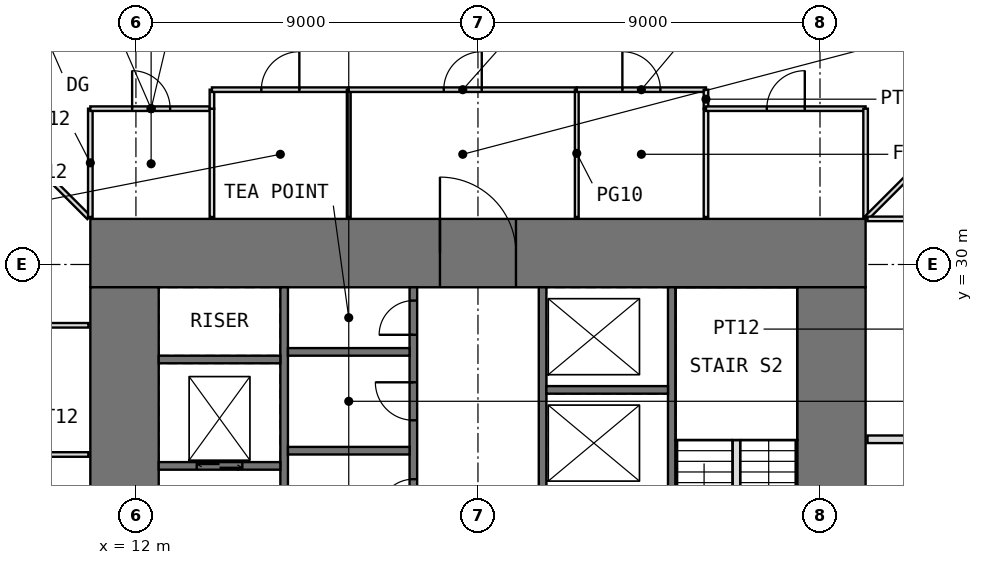
"""IFC4 building model, lengths in metres.
Left out: names, types, materials, properties, quantities, classifications, styles, units other than length and angle.
Written with IfcOpenShell. Run it as: python <this file> out.ifc"""

import sys

from ifc_helpers import new_model, si_unit, direction, frame, frame_2d, origin, place, context, subcontext, project, spatial, rectangle, extrude, element, fill, save


model = new_model("IFC4")
c1 = context("Model", 3, precision=1e-05, world=origin(), true_north=direction((0.0, 1.0)))
c2 = subcontext(c1, "Body", "Model", "MODEL_VIEW")
j1 = project(units=[si_unit("LENGTHUNIT", "METRE"), si_unit("PLANEANGLEUNIT", "RADIAN")], contexts=[c1])
p1 = place(None, origin())
s1 = spatial("IfcSite", under=j1, at=p1, CompositionType="ELEMENT")
p2 = place(p1, origin())
s2 = spatial("IfcBuilding", under=s1, at=p2, CompositionType="ELEMENT")
p3 = place(p2, frame((0.0, 0.0, 42.5)))
s3 = spatial("IfcBuildingStorey", under=s2, at=p3, CompositionType="ELEMENT", Elevation=42.5)
p4 = place(p3, frame((10.8, 30.3, -0.05), z_axis=(0.0, 0.0, 1.0), x_axis=(1.0, 0.0, 0.0)))
e1 = element("IfcWall", 1, at=p4, inside=s3, PredefinedType="SHEAR", context=c2, shape_type="SweptSolid", body=[
    extrude(rectangle(XDim=20.4, YDim=1.8, at=frame_2d((10.2, 0.0))), origin(), (0.0, 0.0, 1.0), 4.0),
])
p5 = place(p4, frame((9.2, 0.0, 0.05)))
e2 = element("IfcOpeningElement", 2, at=p5, cuts=e1, PredefinedType="OPENING", context=c2, shape_type="SweptSolid", body=[
    extrude(rectangle(XDim=2.0, YDim=2.2, at=frame_2d((1.0, 1.1))), frame((0.0, 0.91, 0.0), z_axis=(0.0, -1.0, 0.0), x_axis=(1.0, 0.0, 0.0)), (0.0, 0.0, 1.0), 1.82),
])
p6 = place(p3, frame((11.7, 12.6, -0.05), z_axis=(0.0, 0.0, 1.0), x_axis=(0.0, 1.0, 0.0)))
e3 = element("IfcWall", 3, at=p6, inside=s3, PredefinedType="SHEAR", context=c2, shape_type="SweptSolid", body=[
    extrude(rectangle(XDim=16.8, YDim=1.8, at=frame_2d((8.4, 0.0))), origin(), (0.0, 0.0, 1.0), 4.0),
])
p7 = place(p6, frame((9.9, 0.0, 0.05)))
e4 = element("IfcOpeningElement", 4, at=p7, cuts=e3, PredefinedType="OPENING", context=c2, shape_type="SweptSolid", body=[
    extrude(rectangle(XDim=1.0, YDim=2.2, at=frame_2d((0.5, 1.1))), frame((0.0, 0.91, 0.0), z_axis=(0.0, -1.0, 0.0), x_axis=(1.0, 0.0, 0.0)), (0.0, 0.0, 1.0), 1.82),
])
p8 = place(p3, frame((30.3, 12.6, -0.05), z_axis=(0.0, 0.0, 1.0), x_axis=(0.0, 1.0, 0.0)))
e5 = element("IfcWall", 5, at=p8, inside=s3, PredefinedType="SHEAR", context=c2, shape_type="SweptSolid", body=[
    extrude(rectangle(XDim=16.8, YDim=1.8, at=frame_2d((8.4, 0.0))), origin(), (0.0, 0.0, 1.0), 4.0),
])
p9 = place(p8, frame((5.9, 0.0, 0.05)))
e6 = element("IfcOpeningElement", 6, at=p9, cuts=e5, PredefinedType="OPENING", context=c2, shape_type="SweptSolid", body=[
    extrude(rectangle(XDim=1.0, YDim=2.2, at=frame_2d((0.5, 1.1))), frame((0.0, 0.91, 0.0), z_axis=(0.0, -1.0, 0.0), x_axis=(1.0, 0.0, 0.0)), (0.0, 0.0, 1.0), 1.82),
])
p10 = place(p3, frame((15.9, 12.6, -0.05), z_axis=(0.0, 0.0, 1.0), x_axis=(0.0, 1.0, 0.0)))
e7 = element("IfcWall", 7, at=p10, inside=s3, PredefinedType="SHEAR", context=c2, shape_type="SweptSolid", body=[
    extrude(rectangle(XDim=16.8, YDim=0.2, at=frame_2d((8.4, 0.0))), origin(), (0.0, 0.0, 1.0), 4.0),
])
p11 = place(p10, frame((8.9, 0.0, 0.05)))
e8 = element("IfcOpeningElement", 8, at=p11, cuts=e7, PredefinedType="OPENING", context=c2, shape_type="SweptSolid", body=[
    extrude(rectangle(XDim=1.0, YDim=2.2, at=frame_2d((0.5, 1.1))), frame((0.0, 0.11, 0.0), z_axis=(0.0, -1.0, 0.0), x_axis=(1.0, 0.0, 0.0)), (0.0, 0.0, 1.0), 0.22),
])
p12 = place(p3, frame((19.3, 12.6, -0.05), z_axis=(0.0, 0.0, 1.0), x_axis=(0.0, 1.0, 0.0)))
e9 = element("IfcWall", 9, at=p12, inside=s3, PredefinedType="SHEAR", context=c2, shape_type="SweptSolid", body=[
    extrude(rectangle(XDim=16.8, YDim=0.2, at=frame_2d((8.4, 0.0))), origin(), (0.0, 0.0, 1.0), 4.0),
])
p13 = place(p12, frame((8.7, 0.0, 0.05)))
e10 = element("IfcOpeningElement", 10, at=p13, cuts=e9, PredefinedType="OPENING", context=c2, shape_type="SweptSolid", body=[
    extrude(rectangle(XDim=1.0, YDim=2.2, at=frame_2d((0.5, 1.1))), frame((0.0, 0.11, 0.0), z_axis=(0.0, -1.0, 0.0), x_axis=(1.0, 0.0, 0.0)), (0.0, 0.0, 1.0), 0.22),
])
p14 = place(p12, frame((10.85, 0.0, 0.05)))
e11 = element("IfcOpeningElement", 11, at=p14, cuts=e9, PredefinedType="OPENING", context=c2, shape_type="SweptSolid", body=[
    extrude(rectangle(XDim=0.9, YDim=2.2, at=frame_2d((0.45, 1.1))), frame((0.0, 0.11, 0.0), z_axis=(0.0, -1.0, 0.0), x_axis=(1.0, 0.0, 0.0)), (0.0, 0.0, 1.0), 0.22),
])
p15 = place(p12, frame((13.3, 0.0, 0.05)))
e12 = element("IfcOpeningElement", 12, at=p15, cuts=e9, PredefinedType="OPENING", context=c2, shape_type="SweptSolid", body=[
    extrude(rectangle(XDim=1.0, YDim=2.2, at=frame_2d((0.5, 1.1))), frame((0.0, 0.11, 0.0), z_axis=(0.0, -1.0, 0.0), x_axis=(1.0, 0.0, 0.0)), (0.0, 0.0, 1.0), 0.22),
])
p16 = place(p12, frame((15.55, 0.0, 0.05)))
e13 = element("IfcOpeningElement", 13, at=p16, cuts=e9, PredefinedType="OPENING", context=c2, shape_type="SweptSolid", body=[
    extrude(rectangle(XDim=0.9, YDim=2.2, at=frame_2d((0.45, 1.1))), frame((0.0, 0.11, 0.0), z_axis=(0.0, -1.0, 0.0), x_axis=(1.0, 0.0, 0.0)), (0.0, 0.0, 1.0), 0.22),
])
p17 = place(p12, frame((0.75, 0.0, 0.05)))
e14 = element("IfcOpeningElement", 14, at=p17, cuts=e9, PredefinedType="OPENING", context=c2, shape_type="SweptSolid", body=[
    extrude(rectangle(XDim=1.1, YDim=2.2, at=frame_2d((0.55, 1.1))), frame((0.0, 0.11, 0.0), z_axis=(0.0, -1.0, 0.0), x_axis=(1.0, 0.0, 0.0)), (0.0, 0.0, 1.0), 0.22),
])
p18 = place(p12, frame((3.55, 0.0, 0.05)))
e15 = element("IfcOpeningElement", 15, at=p18, cuts=e9, PredefinedType="OPENING", context=c2, shape_type="SweptSolid", body=[
    extrude(rectangle(XDim=1.1, YDim=2.2, at=frame_2d((0.55, 1.1))), frame((0.0, 0.11, 0.0), z_axis=(0.0, -1.0, 0.0), x_axis=(1.0, 0.0, 0.0)), (0.0, 0.0, 1.0), 0.22),
])
p19 = place(p12, frame((6.35, 0.0, 0.05)))
e16 = element("IfcOpeningElement", 16, at=p19, cuts=e9, PredefinedType="OPENING", context=c2, shape_type="SweptSolid", body=[
    extrude(rectangle(XDim=1.1, YDim=2.2, at=frame_2d((0.55, 1.1))), frame((0.0, 0.11, 0.0), z_axis=(0.0, -1.0, 0.0), x_axis=(1.0, 0.0, 0.0)), (0.0, 0.0, 1.0), 0.22),
])
p20 = place(p3, frame((22.7, 12.6, -0.05), z_axis=(0.0, 0.0, 1.0), x_axis=(0.0, 1.0, 0.0)))
e17 = element("IfcWall", 17, at=p20, inside=s3, PredefinedType="SHEAR", context=c2, shape_type="SweptSolid", body=[
    extrude(rectangle(XDim=16.8, YDim=0.2, at=frame_2d((8.4, 0.0))), origin(), (0.0, 0.0, 1.0), 4.0),
])
p21 = place(p20, frame((7.1, 0.0, 0.05)))
e18 = element("IfcOpeningElement", 18, at=p21, cuts=e17, PredefinedType="OPENING", context=c2, shape_type="SweptSolid", body=[
    extrude(rectangle(XDim=1.0, YDim=2.2, at=frame_2d((0.5, 1.1))), frame((0.0, 0.11, 0.0), z_axis=(0.0, -1.0, 0.0), x_axis=(1.0, 0.0, 0.0)), (0.0, 0.0, 1.0), 0.22),
])
p22 = place(p20, frame((1.55, 0.0, 0.05)))
e19 = element("IfcOpeningElement", 19, at=p22, cuts=e17, PredefinedType="OPENING", context=c2, shape_type="SweptSolid", body=[
    extrude(rectangle(XDim=0.9, YDim=2.2, at=frame_2d((0.45, 1.1))), frame((0.0, 0.11, 0.0), z_axis=(0.0, -1.0, 0.0), x_axis=(1.0, 0.0, 0.0)), (0.0, 0.0, 1.0), 0.22),
])
p23 = place(p20, frame((4.95, 0.0, 0.05)))
e20 = element("IfcOpeningElement", 20, at=p23, cuts=e17, PredefinedType="OPENING", context=c2, shape_type="SweptSolid", body=[
    extrude(rectangle(XDim=0.9, YDim=2.2, at=frame_2d((0.45, 1.1))), frame((0.0, 0.11, 0.0), z_axis=(0.0, -1.0, 0.0), x_axis=(1.0, 0.0, 0.0)), (0.0, 0.0, 1.0), 0.22),
])
p24 = place(p3, frame((26.1, 12.6, -0.05), z_axis=(0.0, 0.0, 1.0), x_axis=(0.0, 1.0, 0.0)))
e21 = element("IfcWall", 21, at=p24, inside=s3, PredefinedType="SHEAR", context=c2, shape_type="SweptSolid", body=[
    extrude(rectangle(XDim=16.8, YDim=0.2, at=frame_2d((8.4, 0.0))), origin(), (0.0, 0.0, 1.0), 4.0),
])
p25 = place(p24, frame((6.9, 0.0, 0.05)))
e22 = element("IfcOpeningElement", 22, at=p25, cuts=e21, PredefinedType="OPENING", context=c2, shape_type="SweptSolid", body=[
    extrude(rectangle(XDim=1.0, YDim=2.2, at=frame_2d((0.5, 1.1))), frame((0.0, 0.11, 0.0), z_axis=(0.0, -1.0, 0.0), x_axis=(1.0, 0.0, 0.0)), (0.0, 0.0, 1.0), 0.22),
])
p26 = place(p3, frame((12.6, 24.7, -0.05), z_axis=(0.0, 0.0, 1.0), x_axis=(1.0, 0.0, 0.0)))
e23 = element("IfcWall", 23, at=p26, inside=s3, PredefinedType="SHEAR", context=c2, shape_type="SweptSolid", body=[
    extrude(rectangle(XDim=3.2, YDim=0.2, at=frame_2d((1.6, 0.0))), origin(), (0.0, 0.0, 1.0), 4.0),
])
p27 = place(p26, frame((1.0, 0.0, 0.05)))
e24 = element("IfcOpeningElement", 24, at=p27, cuts=e23, PredefinedType="OPENING", context=c2, shape_type="SweptSolid", body=[
    extrude(rectangle(XDim=1.2, YDim=2.2, at=frame_2d((0.6, 1.1))), frame((0.0, 0.11, 0.0), z_axis=(0.0, -1.0, 0.0), x_axis=(1.0, 0.0, 0.0)), (0.0, 0.0, 1.0), 0.22),
])
for number, where, z_axis, x_axis in (
    (25, (12.6, 27.5, -0.05), (0.0, 0.0, 1.0), (1.0, 0.0, 0.0)),
    (26, (16.0, 25.1, -0.05), (0.0, 0.0, 1.0), (1.0, 0.0, 0.0)),
    (27, (16.0, 27.7, -0.05), (0.0, 0.0, 1.0), (1.0, 0.0, 0.0)),
    (28, (22.8, 26.7, -0.05), (0.0, 0.0, 1.0), (1.0, 0.0, 0.0)),
):
    element("IfcWall", number, at=place(p3, frame(where, z_axis=z_axis, x_axis=x_axis)), inside=s3, PredefinedType="SHEAR", context=c2, shape_type="SweptSolid", body=[
        extrude(rectangle(XDim=3.2, YDim=0.2, at=frame_2d((1.6, 0.0))), origin(), (0.0, 0.0, 1.0), 4.0),
    ])
for number, where, z_axis, x_axis in (
    (29, (7.9, 25.0, 0.0), (0.0, 0.0, 1.0), (1.0, 0.0, 0.0)),
    (30, (7.9, 28.4, 0.0), (0.0, 0.0, 1.0), (1.0, 0.0, 0.0)),
):
    element("IfcWall", number, at=place(p3, frame(where, z_axis=z_axis, x_axis=x_axis)), inside=s3, PredefinedType="PARTITIONING", context=c2, shape_type="SweptSolid", body=[
        extrude(rectangle(XDim=2.85, YDim=0.12, at=frame_2d((1.425, 0.0))), origin(), (0.0, 0.0, 1.0), 3.75),
    ])
p28 = place(p3, frame((8.398, 33.602, 0.0), z_axis=(0.0, 0.0, 1.0), x_axis=(0.707106781187, -0.707106781187, 0.0)))
e31 = element("IfcWall", 31, at=p28, inside=s3, PredefinedType="PARTITIONING", context=c2, shape_type="SweptSolid", body=[
    extrude(rectangle(XDim=3.346, YDim=0.12, at=frame_2d((1.673, 0.0))), origin(), (0.0, 0.0, 1.0), 3.75),
])
p29 = place(p3, frame((10.8, 31.25, 0.0), z_axis=(0.0, 0.0, 1.0), x_axis=(0.0, 1.0, 0.0)))
e32 = element("IfcWall", 32, at=p29, inside=s3, PredefinedType="PARTITIONING", context=c2, shape_type="SweptSolid", body=[
    extrude(rectangle(XDim=2.85, YDim=0.12, at=frame_2d((1.425, 0.0))), origin(), (0.0, 0.0, 1.0), 3.75),
])
p30 = place(p3, frame((10.8, 34.1, 0.0), z_axis=(0.0, 0.0, 1.0), x_axis=(1.0, 0.0, 0.0)))
e33 = element("IfcWall", 33, at=p30, inside=s3, PredefinedType="PARTITIONING", context=c2, shape_type="SweptSolid", body=[
    extrude(rectangle(XDim=3.2, YDim=0.12, at=frame_2d((1.6, 0.0))), origin(), (0.0, 0.0, 1.0), 3.75),
])
p31 = place(p30, frame((1.1, 0.0, 0.0)))
e34 = element("IfcOpeningElement", 34, at=p31, cuts=e33, PredefinedType="OPENING", context=c2, shape_type="SweptSolid", body=[
    extrude(rectangle(XDim=1.0, YDim=2.2, at=frame_2d((0.5, 1.1))), frame((0.0, 0.07, 0.0), z_axis=(0.0, -1.0, 0.0), x_axis=(1.0, 0.0, 0.0)), (0.0, 0.0, 1.0), 0.14),
])
p32 = place(p3, frame((14.0, 31.25, 0.0), z_axis=(0.0, 0.0, 1.0), x_axis=(0.0, 1.0, 0.0)))
e35 = element("IfcWall", 35, at=p32, inside=s3, PredefinedType="PARTITIONING", context=c2, shape_type="SweptSolid", body=[
    extrude(rectangle(XDim=2.85, YDim=0.12, at=frame_2d((1.425, 0.0))), origin(), (0.0, 0.0, 1.0), 3.75),
])
p33 = place(p3, frame((14.0, 34.1, 0.0), z_axis=(0.0, 0.0, 1.0), x_axis=(0.0, 1.0, 0.0)))
e36 = element("IfcWall", 36, at=p33, inside=s3, PredefinedType="PARTITIONING", context=c2, shape_type="SweptSolid", body=[
    extrude(rectangle(XDim=0.5, YDim=0.12, at=frame_2d((0.25, 0.0))), origin(), (0.0, 0.0, 1.0), 3.75),
])
p34 = place(p3, frame((14.0, 34.6, 0.0), z_axis=(0.0, 0.0, 1.0), x_axis=(1.0, 0.0, 0.0)))
e37 = element("IfcWall", 37, at=p34, inside=s3, PredefinedType="PARTITIONING", context=c2, shape_type="SweptSolid", body=[
    extrude(rectangle(XDim=3.6, YDim=0.12, at=frame_2d((1.8, 0.0))), origin(), (0.0, 0.0, 1.0), 3.75),
])
p35 = place(p34, frame((1.3, 0.0, 0.0)))
e38 = element("IfcOpeningElement", 38, at=p35, cuts=e37, PredefinedType="OPENING", context=c2, shape_type="SweptSolid", body=[
    extrude(rectangle(XDim=1.0, YDim=2.4, at=frame_2d((0.5, 1.2))), frame((0.0, 0.07, 0.0), z_axis=(0.0, -1.0, 0.0), x_axis=(1.0, 0.0, 0.0)), (0.0, 0.0, 1.0), 0.14),
])
p36 = place(p3, frame((17.6, 31.25, 0.0), z_axis=(0.0, 0.0, 1.0), x_axis=(0.0, 1.0, 0.0)))
e39 = element("IfcWall", 39, at=p36, inside=s3, PredefinedType="PARTITIONING", context=c2, shape_type="SweptSolid", body=[
    extrude(rectangle(XDim=3.35, YDim=0.1, at=frame_2d((1.675, 0.0))), origin(), (0.0, 0.0, 1.0), 3.75),
])
p37 = place(p3, frame((17.6, 34.6, 0.0), z_axis=(0.0, 0.0, 1.0), x_axis=(1.0, 0.0, 0.0)))
e40 = element("IfcWall", 40, at=p37, inside=s3, PredefinedType="PARTITIONING", context=c2, shape_type="SweptSolid", body=[
    extrude(rectangle(XDim=6.0, YDim=0.12, at=frame_2d((3.0, 0.0))), origin(), (0.0, 0.0, 1.0), 3.75),
])
p38 = place(p37, frame((2.5, 0.0, 0.0)))
e41 = element("IfcOpeningElement", 41, at=p38, cuts=e40, PredefinedType="OPENING", context=c2, shape_type="SweptSolid", body=[
    extrude(rectangle(XDim=1.0, YDim=2.4, at=frame_2d((0.5, 1.2))), frame((0.0, 0.07, 0.0), z_axis=(0.0, -1.0, 0.0), x_axis=(1.0, 0.0, 0.0)), (0.0, 0.0, 1.0), 0.14),
])
p39 = place(p3, frame((23.6, 31.25, 0.0), z_axis=(0.0, 0.0, 1.0), x_axis=(0.0, 1.0, 0.0)))
e42 = element("IfcWall", 42, at=p39, inside=s3, PredefinedType="PARTITIONING", context=c2, shape_type="SweptSolid", body=[
    extrude(rectangle(XDim=3.35, YDim=0.1, at=frame_2d((1.675, 0.0))), origin(), (0.0, 0.0, 1.0), 3.75),
])
p40 = place(p3, frame((23.6, 34.6, 0.0), z_axis=(0.0, 0.0, 1.0), x_axis=(1.0, 0.0, 0.0)))
e43 = element("IfcWall", 43, at=p40, inside=s3, PredefinedType="PARTITIONING", context=c2, shape_type="SweptSolid", body=[
    extrude(rectangle(XDim=3.4, YDim=0.12, at=frame_2d((1.7, 0.0))), origin(), (0.0, 0.0, 1.0), 3.75),
])
p41 = place(p40, frame((1.2, 0.0, 0.0)))
e44 = element("IfcOpeningElement", 44, at=p41, cuts=e43, PredefinedType="OPENING", context=c2, shape_type="SweptSolid", body=[
    extrude(rectangle(XDim=1.0, YDim=2.4, at=frame_2d((0.5, 1.2))), frame((0.0, 0.07, 0.0), z_axis=(0.0, -1.0, 0.0), x_axis=(1.0, 0.0, 0.0)), (0.0, 0.0, 1.0), 0.14),
])
p42 = place(p3, frame((27.0, 31.25, 0.0), z_axis=(0.0, 0.0, 1.0), x_axis=(0.0, 1.0, 0.0)))
e45 = element("IfcWall", 45, at=p42, inside=s3, PredefinedType="PARTITIONING", context=c2, shape_type="SweptSolid", body=[
    extrude(rectangle(XDim=2.85, YDim=0.12, at=frame_2d((1.425, 0.0))), origin(), (0.0, 0.0, 1.0), 3.75),
])
p43 = place(p3, frame((27.0, 34.1, 0.0), z_axis=(0.0, 0.0, 1.0), x_axis=(0.0, 1.0, 0.0)))
e46 = element("IfcWall", 46, at=p43, inside=s3, PredefinedType="PARTITIONING", context=c2, shape_type="SweptSolid", body=[
    extrude(rectangle(XDim=0.5, YDim=0.12, at=frame_2d((0.25, 0.0))), origin(), (0.0, 0.0, 1.0), 3.75),
])
p44 = place(p3, frame((27.0, 34.1, 0.0), z_axis=(0.0, 0.0, 1.0), x_axis=(1.0, 0.0, 0.0)))
e47 = element("IfcWall", 47, at=p44, inside=s3, PredefinedType="PARTITIONING", context=c2, shape_type="SweptSolid", body=[
    extrude(rectangle(XDim=4.2, YDim=0.12, at=frame_2d((2.1, 0.0))), origin(), (0.0, 0.0, 1.0), 3.75),
])
p45 = place(p44, frame((1.6, 0.0, 0.0)))
e48 = element("IfcOpeningElement", 48, at=p45, cuts=e47, PredefinedType="OPENING", context=c2, shape_type="SweptSolid", body=[
    extrude(rectangle(XDim=1.0, YDim=2.2, at=frame_2d((0.5, 1.1))), frame((0.0, 0.07, 0.0), z_axis=(0.0, -1.0, 0.0), x_axis=(1.0, 0.0, 0.0)), (0.0, 0.0, 1.0), 0.14),
])
p46 = place(p3, frame((31.2, 31.25, 0.0), z_axis=(0.0, 0.0, 1.0), x_axis=(0.0, 1.0, 0.0)))
e49 = element("IfcWall", 49, at=p46, inside=s3, PredefinedType="PARTITIONING", context=c2, shape_type="SweptSolid", body=[
    extrude(rectangle(XDim=2.85, YDim=0.12, at=frame_2d((1.425, 0.0))), origin(), (0.0, 0.0, 1.0), 3.75),
])
p47 = place(p3, frame((31.235, 31.235, 0.0), z_axis=(0.0, 0.0, 1.0), x_axis=(0.707106781187, 0.707106781187, 0.0)))
e50 = element("IfcWall", 50, at=p47, inside=s3, PredefinedType="PARTITIONING", context=c2, shape_type="SweptSolid", body=[
    extrude(rectangle(XDim=5.168, YDim=0.12, at=frame_2d((2.584, 0.0))), origin(), (0.0, 0.0, 1.0), 3.75),
])
p48 = place(p3, frame((31.25, 25.4, 0.0), z_axis=(0.0, 0.0, 1.0), x_axis=(1.0, 0.0, 0.0)))
e51 = element("IfcWall", 51, at=p48, inside=s3, PredefinedType="PARTITIONING", context=c2, shape_type="SweptSolid", body=[
    extrude(rectangle(XDim=3.35, YDim=0.2, at=frame_2d((1.675, 0.0))), origin(), (0.0, 0.0, 1.0), 3.75),
])
p49 = place(p3, frame((31.25, 31.2, 0.0), z_axis=(0.0, 0.0, 1.0), x_axis=(1.0, 0.0, 0.0)))
e52 = element("IfcWall", 52, at=p49, inside=s3, PredefinedType="PARTITIONING", context=c2, shape_type="SweptSolid", body=[
    extrude(rectangle(XDim=3.35, YDim=0.12, at=frame_2d((1.675, 0.0))), origin(), (0.0, 0.0, 1.0), 3.75),
])
p50 = place(p3, frame((27.8, 22.3, 0.0), z_axis=(0.0, 0.0, 1.0), x_axis=(0.0, 1.0, 0.0)))
e53 = element("IfcWall", 53, at=p50, inside=s3, PredefinedType="PARTITIONING", context=c2, shape_type="SweptSolid", body=[
    extrude(rectangle(XDim=3.08, YDim=0.2, at=frame_2d((1.54, 0.0))), origin(), (0.0, 0.0, 1.0), 4.0),
])
p51 = place(p5, origin())
e54 = element("IfcDoor", 54, at=p51, inside=s3, OperationType="DOUBLE_DOOR_SINGLE_SWING", PredefinedType="DOOR", context=c2, shape_type="SweptSolid", body=[
    extrude(rectangle(XDim=2.0, YDim=2.2, at=frame_2d((1.0, 1.1))), frame((0.0, 0.025, 0.0), z_axis=(0.0, -1.0, 0.0), x_axis=(1.0, 0.0, 0.0)), (0.0, 0.0, 1.0), 0.05),
])
fill(e2, e54)
p52 = place(p14, origin())
e55 = element("IfcDoor", 55, at=p52, inside=s3, OperationType="SINGLE_SWING_LEFT", PredefinedType="DOOR", context=c2, shape_type="SweptSolid", body=[
    extrude(rectangle(XDim=0.9, YDim=2.2, at=frame_2d((0.45, 1.1))), frame((0.0, 0.025, 0.0), z_axis=(0.0, -1.0, 0.0), x_axis=(1.0, 0.0, 0.0)), (0.0, 0.0, 1.0), 0.05),
])
fill(e11, e55)
p53 = place(p15, origin())
e56 = element("IfcDoor", 56, at=p53, inside=s3, OperationType="SINGLE_SWING_RIGHT", PredefinedType="DOOR", context=c2, shape_type="SweptSolid", body=[
    extrude(rectangle(XDim=1.0, YDim=2.2, at=frame_2d((0.5, 1.1))), frame((0.0, 0.025, 0.0), z_axis=(0.0, -1.0, 0.0), x_axis=(1.0, 0.0, 0.0)), (0.0, 0.0, 1.0), 0.05),
])
fill(e12, e56)
p54 = place(p16, origin())
e57 = element("IfcDoor", 57, at=p54, inside=s3, OperationType="SINGLE_SWING_LEFT", PredefinedType="DOOR", context=c2, shape_type="SweptSolid", body=[
    extrude(rectangle(XDim=0.9, YDim=2.2, at=frame_2d((0.45, 1.1))), frame((0.0, 0.025, 0.0), z_axis=(0.0, -1.0, 0.0), x_axis=(1.0, 0.0, 0.0)), (0.0, 0.0, 1.0), 0.05),
])
fill(e13, e57)
p55 = place(p31, origin())
e58 = element("IfcDoor", 58, at=p55, inside=s3, OperationType="SINGLE_SWING_LEFT", PredefinedType="DOOR", context=c2, shape_type="SweptSolid", body=[
    extrude(rectangle(XDim=1.0, YDim=2.2, at=frame_2d((0.5, 1.1))), frame((0.0, 0.025, 0.0), z_axis=(0.0, -1.0, 0.0), x_axis=(1.0, 0.0, 0.0)), (0.0, 0.0, 1.0), 0.05),
])
fill(e34, e58)
p56 = place(p35, origin())
e59 = element("IfcDoor", 59, at=p56, inside=s3, OperationType="SINGLE_SWING_RIGHT", PredefinedType="DOOR", context=c2, shape_type="SweptSolid", body=[
    extrude(rectangle(XDim=1.0, YDim=2.4, at=frame_2d((0.5, 1.2))), frame((0.0, 0.025, 0.0), z_axis=(0.0, -1.0, 0.0), x_axis=(1.0, 0.0, 0.0)), (0.0, 0.0, 1.0), 0.05),
])
fill(e38, e59)
p57 = place(p41, origin())
e60 = element("IfcDoor", 60, at=p57, inside=s3, OperationType="SINGLE_SWING_LEFT", PredefinedType="DOOR", context=c2, shape_type="SweptSolid", body=[
    extrude(rectangle(XDim=1.0, YDim=2.4, at=frame_2d((0.5, 1.2))), frame((0.0, 0.025, 0.0), z_axis=(0.0, -1.0, 0.0), x_axis=(1.0, 0.0, 0.0)), (0.0, 0.0, 1.0), 0.05),
])
fill(e44, e60)
p58 = place(p45, origin())
e61 = element("IfcDoor", 61, at=p58, inside=s3, OperationType="SINGLE_SWING_RIGHT", PredefinedType="DOOR", context=c2, shape_type="SweptSolid", body=[
    extrude(rectangle(XDim=1.0, YDim=2.2, at=frame_2d((0.5, 1.1))), frame((0.0, 0.025, 0.0), z_axis=(0.0, -1.0, 0.0), x_axis=(1.0, 0.0, 0.0)), (0.0, 0.0, 1.0), 0.05),
])
fill(e48, e61)
p59 = place(p38, origin())
e62 = element("IfcDoor", 62, at=p59, inside=s3, OperationType="SINGLE_SWING_RIGHT", PredefinedType="DOOR", context=c2, shape_type="SweptSolid", body=[
    extrude(rectangle(XDim=1.0, YDim=2.4, at=frame_2d((0.5, 1.2))), frame((0.0, 0.025, 0.0), z_axis=(0.0, -1.0, 0.0), x_axis=(1.0, 0.0, 0.0)), (0.0, 0.0, 1.0), 0.05),
])
fill(e41, e62)
p60 = place(p27, origin())
e63 = element("IfcDoor", 63, at=p60, inside=s3, OperationType="DOUBLE_DOOR_SLIDING", PredefinedType="DOOR", context=c2, shape_type="SweptSolid", body=[
    extrude(rectangle(XDim=1.2, YDim=2.2, at=frame_2d((0.6, 1.1))), frame((0.0, 0.025, 0.0), z_axis=(0.0, -1.0, 0.0), x_axis=(1.0, 0.0, 0.0)), (0.0, 0.0, 1.0), 0.05),
])
fill(e24, e63)
save(model, sys.argv[1])
